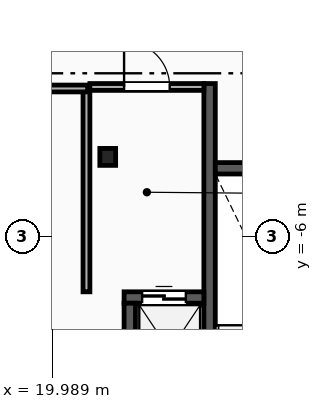
"""IFC4 building model, lengths in metres.
Left out: names, types, materials, properties, quantities, classifications, styles, units other than length and angle.
Written with IfcOpenShell. Run it as: python <this file> out.ifc"""

import sys

from ifc_helpers import new_model, si_unit, direction, frame, frame_2d, origin, origin_2d, place, context, subcontext, project, spatial, rectangle, i_section, extrude, element, fill, save


model = new_model("IFC4")
c1 = context("Model", 3, precision=1e-05, world=origin(), true_north=direction((0.0, 1.0)))
c2 = subcontext(c1, "Body", "Model", "MODEL_VIEW")
j1 = project(units=[si_unit("LENGTHUNIT", "METRE"), si_unit("PLANEANGLEUNIT", "RADIAN")], contexts=[c1])
p1 = place(None, origin())
s1 = spatial("IfcSite", under=j1, at=p1, CompositionType="ELEMENT")
p2 = place(p1, origin())
s2 = spatial("IfcBuilding", under=s1, at=p2, CompositionType="ELEMENT")
p3 = place(p2, frame((0.0, 0.0, 246.8)))
s3 = spatial("IfcBuildingStorey", under=s2, at=p3, CompositionType="ELEMENT", Elevation=246.8)
p4 = place(p3, frame((21.45, -3.9, 0.0), z_axis=(0.0, 0.0, 1.0), x_axis=(1.0, 0.0, 0.0)))
e1 = element("IfcColumn", 1, at=p4, inside=s3, PredefinedType="COLUMN", context=c2, shape_type="SweptSolid", body=[
    extrude(i_section(OverallWidth=0.416, OverallDepth=0.446, WebThickness=0.039, FlangeThickness=0.063, FilletRadius=0.018, at=origin_2d()), origin(), (0.0, 0.0, 1.0), 3.6),
])
p5 = place(p3, frame((24.13, -12.65, 0.0), z_axis=(0.0, 0.0, 1.0), x_axis=(0.0, 1.0, 0.0)))
e2 = element("IfcWall", 2, at=p5, inside=s3, PredefinedType="SHEAR", context=c2, shape_type="SweptSolid", body=[
    extrude(rectangle(XDim=10.68, YDim=0.3, at=frame_2d((5.34, 0.0))), origin(), (0.0, 0.0, 1.0), 3.34),
])
p6 = place(p3, frame((24.28, -4.2, 0.0), z_axis=(0.0, 0.0, 1.0), x_axis=(1.0, 0.0, 0.0)))
e3 = element("IfcWall", 3, at=p6, inside=s3, PredefinedType="SHEAR", context=c2, shape_type="SweptSolid", body=[
    extrude(rectangle(XDim=3.16, YDim=0.3, at=frame_2d((1.58, 0.0))), origin(), (0.0, 0.0, 1.0), 3.34),
])
p7 = place(p3, frame((20.89, -7.45, 0.0), z_axis=(0.0, 0.0, 1.0), x_axis=(0.0, 1.0, 0.0)))
e4 = element("IfcWall", 4, at=p7, inside=s3, PredefinedType="PARTITIONING", context=c2, shape_type="SweptSolid", body=[
    extrude(rectangle(XDim=5.3, YDim=0.18, at=frame_2d((2.65, 0.0))), origin(), (0.0, 0.0, 1.0), 3.34),
])
p8 = place(p3, frame((20.98, -2.06, 0.0), z_axis=(0.0, 0.0, 1.0), x_axis=(1.0, 0.0, 0.0)))
e5 = element("IfcWall", 5, at=p8, inside=s3, PredefinedType="PARTITIONING", context=c2, shape_type="SweptSolid", body=[
    extrude(rectangle(XDim=3.0, YDim=0.18, at=frame_2d((1.5, 0.0))), origin(), (0.0, 0.0, 1.0), 3.34),
])
p9 = place(p8, frame((0.9, 0.0, 0.0)))
e6 = element("IfcOpeningElement", 6, at=p9, cuts=e5, PredefinedType="OPENING", context=c2, shape_type="SweptSolid", body=[
    extrude(rectangle(XDim=1.2, YDim=2.15, at=frame_2d((0.6, 1.075))), frame((0.0, 0.1, 0.0), z_axis=(0.0, -1.0, 0.0), x_axis=(1.0, 0.0, 0.0)), (0.0, 0.0, 1.0), 0.2),
])
p10 = place(p3, frame((21.88, -7.6, 0.0), z_axis=(0.0, 0.0, 1.0), x_axis=(1.0, 0.0, 0.0)))
e7 = element("IfcWall", 7, at=p10, inside=s3, PredefinedType="SHEAR", context=c2, shape_type="SweptSolid", body=[
    extrude(rectangle(XDim=2.1, YDim=0.3, at=frame_2d((1.05, 0.0))), origin(), (0.0, 0.0, 1.0), 3.34),
])
p11 = place(p10, frame((0.475, 0.0, 0.0)))
e8 = element("IfcOpeningElement", 8, at=p11, cuts=e7, PredefinedType="OPENING", context=c2, shape_type="SweptSolid", body=[
    extrude(rectangle(XDim=1.15, YDim=2.2, at=frame_2d((0.575, 1.1))), frame((0.0, 0.16, 0.0), z_axis=(0.0, -1.0, 0.0), x_axis=(1.0, 0.0, 0.0)), (0.0, 0.0, 1.0), 0.32),
])
p12 = place(p3, frame((22.03, -10.25, 0.0), z_axis=(0.0, 0.0, 1.0), x_axis=(0.0, 1.0, 0.0)))
e9 = element("IfcWall", 9, at=p12, inside=s3, PredefinedType="SHEAR", context=c2, shape_type="SweptSolid", body=[
    extrude(rectangle(XDim=2.5, YDim=0.3, at=frame_2d((1.25, 0.0))), origin(), (0.0, 0.0, 1.0), 3.34),
])
p13 = place(p3, frame((13.521, -2.1, 0.0), z_axis=(0.0, 0.0, 1.0), x_axis=(1.0, 0.0, 0.0)))
e10 = element("IfcWall", 10, at=p13, inside=s3, PredefinedType="PARTITIONING", context=c2, shape_type="SweptSolid", body=[
    extrude(rectangle(XDim=7.398, YDim=0.18, at=frame_2d((3.699, 0.0))), origin(), (0.0, 0.0, 1.0), 3.34),
])
p14 = place(p9, origin())
e11 = element("IfcDoor", 11, at=p14, inside=s3, OperationType="SINGLE_SWING_LEFT", PredefinedType="DOOR", context=c2, shape_type="SweptSolid", body=[
    extrude(rectangle(XDim=1.2, YDim=2.15, at=frame_2d((0.6, 1.075))), frame((0.0, 0.025, 0.0), z_axis=(0.0, -1.0, 0.0), x_axis=(1.0, 0.0, 0.0)), (0.0, 0.0, 1.0), 0.05),
])
fill(e6, e11)
p15 = place(p11, origin())
e12 = element("IfcDoor", 12, at=p15, inside=s3, OperationType="SLIDING_TO_LEFT", PredefinedType="TRAPDOOR", context=c2, shape_type="SweptSolid", body=[
    extrude(rectangle(XDim=1.15, YDim=2.2, at=frame_2d((0.575, 1.1))), frame((0.0, 0.025, 0.0), z_axis=(0.0, -1.0, 0.0), x_axis=(1.0, 0.0, 0.0)), (0.0, 0.0, 1.0), 0.05),
])
fill(e8, e12)
save(model, sys.argv[1])
